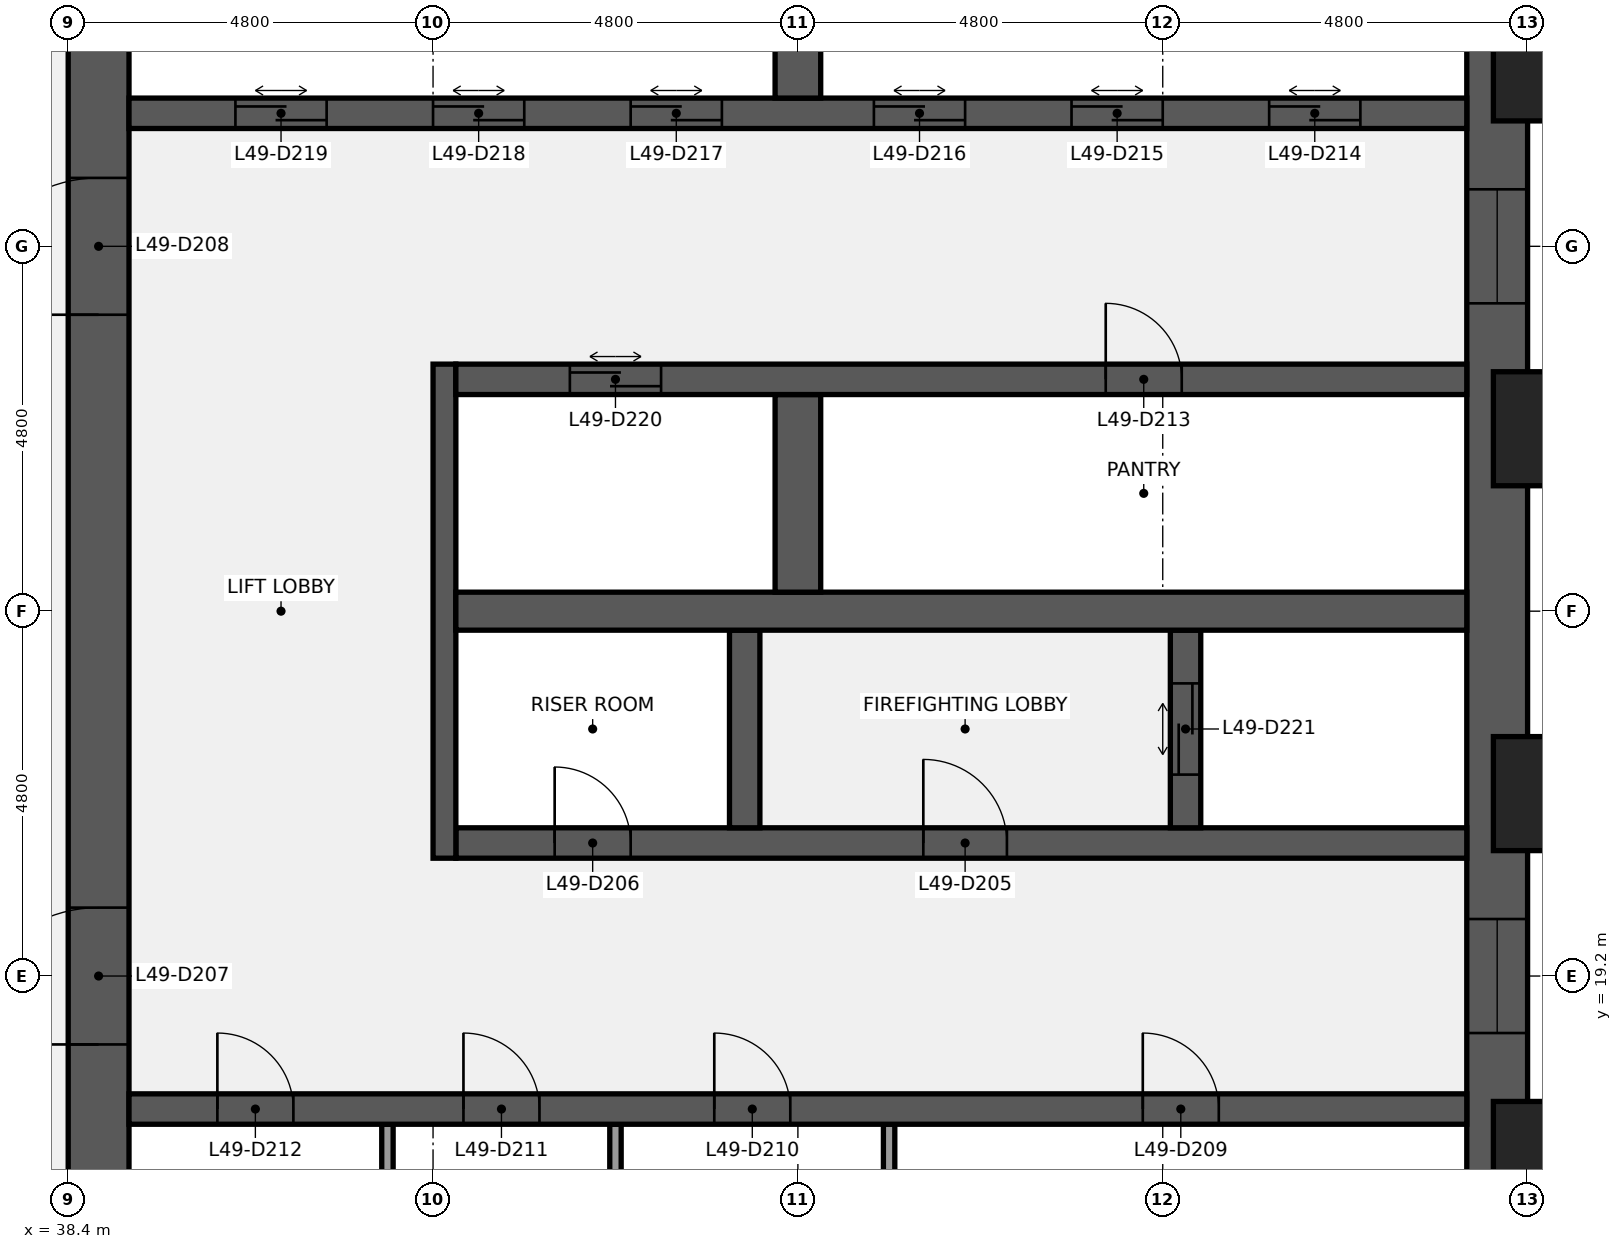
"""IFC4 building model, lengths in metres.
Left out: names, types, materials, properties, quantities, classifications, styles, units other than length and angle.
Written with IfcOpenShell. Run it as: python <this file> out.ifc"""

import sys

from ifc_helpers import new_model, si_unit, direction, frame, frame_2d, origin, origin_2d, place, context, subcontext, project, spatial, rectangle, extrude, element, fill, save


model = new_model("IFC4")
c1 = context("Model", 3, precision=1e-05, world=origin(), true_north=direction((0.0, 1.0)))
c2 = subcontext(c1, "Body", "Model", "MODEL_VIEW")
j1 = project(units=[si_unit("LENGTHUNIT", "METRE"), si_unit("PLANEANGLEUNIT", "RADIAN")], contexts=[c1])
p1 = place(None, origin())
s1 = spatial("IfcSite", under=j1, at=p1, CompositionType="ELEMENT")
p2 = place(p1, origin())
s2 = spatial("IfcBuilding", under=s1, at=p2, CompositionType="ELEMENT")
p3 = place(p2, frame((0.0, 0.0, 225.2)))
s3 = spatial("IfcBuildingStorey", under=s2, at=p3, CompositionType="ELEMENT", Elevation=225.2)
p4 = place(p3, frame((57.2, 38.4, 0.0), z_axis=(0.0, 0.0, 1.0), x_axis=(0.0, -1.0, 0.0)))
e1 = element("IfcWall", 1, at=p4, inside=s3, PredefinedType="SHEAR", context=c2, shape_type="SweptSolid", body=[
    extrude(rectangle(XDim=28.8, YDim=0.8, at=frame_2d((14.4, 0.0))), origin(), (0.0, 0.0, 1.0), 3.84),
])
p5 = place(p4, frame((18.45, 0.0, 0.9)))
e2 = element("IfcOpeningElement", 2, at=p5, cuts=e1, PredefinedType="OPENING", context=c2, shape_type="SweptSolid", body=[
    extrude(rectangle(XDim=1.5, YDim=1.5, at=frame_2d((0.75, 0.75))), frame((0.0, 0.41, 0.0), z_axis=(0.0, -1.0, 0.0), x_axis=(1.0, 0.0, 0.0)), (0.0, 0.0, 1.0), 0.82),
])
p6 = place(p4, frame((8.85, 0.0, 0.9)))
e3 = element("IfcOpeningElement", 3, at=p6, cuts=e1, PredefinedType="OPENING", context=c2, shape_type="SweptSolid", body=[
    extrude(rectangle(XDim=1.5, YDim=1.5, at=frame_2d((0.75, 0.75))), frame((0.0, 0.41, 0.0), z_axis=(0.0, -1.0, 0.0), x_axis=(1.0, 0.0, 0.0)), (0.0, 0.0, 1.0), 0.82),
])
p7 = place(p3, frame((38.8, 9.6, 0.0), z_axis=(0.0, 0.0, 1.0), x_axis=(0.0, 1.0, 0.0)))
e4 = element("IfcWall", 4, at=p7, inside=s3, PredefinedType="SHEAR", context=c2, shape_type="SweptSolid", body=[
    extrude(rectangle(XDim=28.8, YDim=0.8, at=frame_2d((14.4, 0.0))), origin(), (0.0, 0.0, 1.0), 3.84),
])
p8 = place(p7, frame((8.7, 0.0, 0.0)))
e5 = element("IfcOpeningElement", 5, at=p8, cuts=e4, PredefinedType="OPENING", context=c2, shape_type="SweptSolid", body=[
    extrude(rectangle(XDim=1.8, YDim=2.1, at=frame_2d((0.9, 1.05))), frame((0.0, 0.41, 0.0), z_axis=(0.0, -1.0, 0.0), x_axis=(1.0, 0.0, 0.0)), (0.0, 0.0, 1.0), 0.82),
])
p9 = place(p7, frame((18.3, 0.0, 0.0)))
e6 = element("IfcOpeningElement", 6, at=p9, cuts=e4, PredefinedType="OPENING", context=c2, shape_type="SweptSolid", body=[
    extrude(rectangle(XDim=1.8, YDim=2.1, at=frame_2d((0.9, 1.05))), frame((0.0, 0.41, 0.0), z_axis=(0.0, -1.0, 0.0), x_axis=(1.0, 0.0, 0.0)), (0.0, 0.0, 1.0), 0.82),
])
for number, where, z_axis, x_axis in (
    (7, (49.2, 14.65, 0.0), (0.0, 0.0, 1.0), (0.0, 1.0, 0.0)),
    (8, (45.6, 14.65, 0.0), (0.0, 0.0, 1.0), (0.0, 1.0, 0.0)),
    (9, (42.6, 14.65, 0.0), (0.0, 0.0, 1.0), (0.0, 1.0, 0.0)),
):
    element("IfcWall", number, at=place(p3, frame(where, z_axis=z_axis, x_axis=x_axis)), inside=s3, PredefinedType="PARTITIONING", context=c2, shape_type="SweptSolid", body=[
        extrude(rectangle(XDim=2.6, YDim=0.15, at=frame_2d((1.3, 0.0))), origin(), (0.0, 0.0, 1.0), 3.84),
    ])
p10 = place(p3, frame((39.2, 17.45, 0.0), z_axis=(0.0, 0.0, 1.0), x_axis=(1.0, 0.0, 0.0)))
e10 = element("IfcWall", 10, at=p10, inside=s3, PredefinedType="SHEAR", context=c2, shape_type="SweptSolid", body=[
    extrude(rectangle(XDim=17.6, YDim=0.4, at=frame_2d((8.8, 0.0))), origin(), (0.0, 0.0, 1.0), 3.84),
])
p11 = place(p10, frame((13.337, 0.0, 0.0)))
e11 = element("IfcOpeningElement", 11, at=p11, cuts=e10, PredefinedType="OPENING", context=c2, shape_type="SweptSolid", body=[
    extrude(rectangle(XDim=1.0, YDim=2.1, at=frame_2d((0.5, 1.05))), frame((0.0, 0.21, 0.0), z_axis=(0.0, -1.0, 0.0), x_axis=(1.0, 0.0, 0.0)), (0.0, 0.0, 1.0), 0.42),
])
p12 = place(p10, frame((7.7, 0.0, 0.0)))
e12 = element("IfcOpeningElement", 12, at=p12, cuts=e10, PredefinedType="OPENING", context=c2, shape_type="SweptSolid", body=[
    extrude(rectangle(XDim=1.0, YDim=2.1, at=frame_2d((0.5, 1.05))), frame((0.0, 0.21, 0.0), z_axis=(0.0, -1.0, 0.0), x_axis=(1.0, 0.0, 0.0)), (0.0, 0.0, 1.0), 0.42),
])
p13 = place(p10, frame((4.4, 0.0, 0.0)))
e13 = element("IfcOpeningElement", 13, at=p13, cuts=e10, PredefinedType="OPENING", context=c2, shape_type="SweptSolid", body=[
    extrude(rectangle(XDim=1.0, YDim=2.1, at=frame_2d((0.5, 1.05))), frame((0.0, 0.21, 0.0), z_axis=(0.0, -1.0, 0.0), x_axis=(1.0, 0.0, 0.0)), (0.0, 0.0, 1.0), 0.42),
])
p14 = place(p10, frame((1.163, 0.0, 0.0)))
e14 = element("IfcOpeningElement", 14, at=p14, cuts=e10, PredefinedType="OPENING", context=c2, shape_type="SweptSolid", body=[
    extrude(rectangle(XDim=1.0, YDim=2.1, at=frame_2d((0.5, 1.05))), frame((0.0, 0.21, 0.0), z_axis=(0.0, -1.0, 0.0), x_axis=(1.0, 0.0, 0.0)), (0.0, 0.0, 1.0), 0.42),
])
p15 = place(p3, frame((43.5, 20.95, 0.0), z_axis=(0.0, 0.0, 1.0), x_axis=(1.0, 0.0, 0.0)))
e15 = element("IfcWall", 15, at=p15, inside=s3, PredefinedType="SHEAR", context=c2, shape_type="SweptSolid", body=[
    extrude(rectangle(XDim=13.3, YDim=0.4, at=frame_2d((6.65, 0.0))), origin(), (0.0, 0.0, 1.0), 3.84),
])
p16 = place(p15, frame((6.15, 0.0, 0.0)))
e16 = element("IfcOpeningElement", 16, at=p16, cuts=e15, PredefinedType="OPENING", context=c2, shape_type="SweptSolid", body=[
    extrude(rectangle(XDim=1.1, YDim=2.1, at=frame_2d((0.55, 1.05))), frame((0.0, 0.21, 0.0), z_axis=(0.0, -1.0, 0.0), x_axis=(1.0, 0.0, 0.0)), (0.0, 0.0, 1.0), 0.42),
])
p17 = place(p15, frame((1.3, 0.0, 0.0)))
e17 = element("IfcOpeningElement", 17, at=p17, cuts=e15, PredefinedType="OPENING", context=c2, shape_type="SweptSolid", body=[
    extrude(rectangle(XDim=1.0, YDim=2.1, at=frame_2d((0.5, 1.05))), frame((0.0, 0.21, 0.0), z_axis=(0.0, -1.0, 0.0), x_axis=(1.0, 0.0, 0.0)), (0.0, 0.0, 1.0), 0.42),
])
p18 = place(p3, frame((43.35, 20.75, 0.0), z_axis=(0.0, 0.0, 1.0), x_axis=(0.0, 1.0, 0.0)))
e18 = element("IfcWall", 18, at=p18, inside=s3, PredefinedType="SHEAR", context=c2, shape_type="SweptSolid", body=[
    extrude(rectangle(XDim=6.5, YDim=0.3, at=frame_2d((3.25, 0.0))), origin(), (0.0, 0.0, 1.0), 3.84),
])
p19 = place(p3, frame((53.1, 21.15, 0.0), z_axis=(0.0, 0.0, 1.0), x_axis=(0.0, 1.0, 0.0)))
e19 = element("IfcWall", 19, at=p19, inside=s3, PredefinedType="SHEAR", context=c2, shape_type="SweptSolid", body=[
    extrude(rectangle(XDim=2.6, YDim=0.4, at=frame_2d((1.3, 0.0))), origin(), (0.0, 0.0, 1.0), 3.84),
])
p20 = place(p19, frame((0.7, 0.0, 0.0)))
e20 = element("IfcOpeningElement", 20, at=p20, cuts=e19, PredefinedType="OPENING", context=c2, shape_type="SweptSolid", body=[
    extrude(rectangle(XDim=1.2, YDim=2.1, at=frame_2d((0.6, 1.05))), frame((0.0, 0.21, 0.0), z_axis=(0.0, -1.0, 0.0), x_axis=(1.0, 0.0, 0.0)), (0.0, 0.0, 1.0), 0.42),
])
p21 = place(p3, frame((47.3, 21.15, 0.0), z_axis=(0.0, 0.0, 1.0), x_axis=(0.0, 1.0, 0.0)))
e21 = element("IfcWall", 21, at=p21, inside=s3, PredefinedType="SHEAR", context=c2, shape_type="SweptSolid", body=[
    extrude(rectangle(XDim=2.6, YDim=0.4, at=frame_2d((1.3, 0.0))), origin(), (0.0, 0.0, 1.0), 3.84),
])
p22 = place(p3, frame((43.5, 24.0, 0.0), z_axis=(0.0, 0.0, 1.0), x_axis=(1.0, 0.0, 0.0)))
e22 = element("IfcWall", 22, at=p22, inside=s3, PredefinedType="SHEAR", context=c2, shape_type="SweptSolid", body=[
    extrude(rectangle(XDim=13.3, YDim=0.5, at=frame_2d((6.65, 0.0))), origin(), (0.0, 0.0, 1.0), 3.84),
])
p23 = place(p3, frame((48.0, 24.25, 0.0), z_axis=(0.0, 0.0, 1.0), x_axis=(0.0, 1.0, 0.0)))
e23 = element("IfcWall", 23, at=p23, inside=s3, PredefinedType="SHEAR", context=c2, shape_type="SweptSolid", body=[
    extrude(rectangle(XDim=2.6, YDim=0.6, at=frame_2d((1.3, 0.0))), origin(), (0.0, 0.0, 1.0), 3.84),
])
p24 = place(p3, frame((43.5, 27.05, 0.0), z_axis=(0.0, 0.0, 1.0), x_axis=(1.0, 0.0, 0.0)))
e24 = element("IfcWall", 24, at=p24, inside=s3, PredefinedType="SHEAR", context=c2, shape_type="SweptSolid", body=[
    extrude(rectangle(XDim=13.3, YDim=0.4, at=frame_2d((6.65, 0.0))), origin(), (0.0, 0.0, 1.0), 3.84),
])
p25 = place(p24, frame((8.55, 0.0, 0.0)))
e25 = element("IfcOpeningElement", 25, at=p25, cuts=e24, PredefinedType="OPENING", context=c2, shape_type="SweptSolid", body=[
    extrude(rectangle(XDim=1.0, YDim=2.1, at=frame_2d((0.5, 1.05))), frame((0.0, 0.21, 0.0), z_axis=(0.0, -1.0, 0.0), x_axis=(1.0, 0.0, 0.0)), (0.0, 0.0, 1.0), 0.42),
])
p26 = place(p24, frame((1.5, 0.0, 0.0)))
e26 = element("IfcOpeningElement", 26, at=p26, cuts=e24, PredefinedType="OPENING", context=c2, shape_type="SweptSolid", body=[
    extrude(rectangle(XDim=1.2, YDim=2.1, at=frame_2d((0.6, 1.05))), frame((0.0, 0.21, 0.0), z_axis=(0.0, -1.0, 0.0), x_axis=(1.0, 0.0, 0.0)), (0.0, 0.0, 1.0), 0.42),
])
p27 = place(p3, frame((39.2, 30.55, 0.0), z_axis=(0.0, 0.0, 1.0), x_axis=(1.0, 0.0, 0.0)))
e27 = element("IfcWall", 27, at=p27, inside=s3, PredefinedType="SHEAR", context=c2, shape_type="SweptSolid", body=[
    extrude(rectangle(XDim=17.6, YDim=0.4, at=frame_2d((8.8, 0.0))), origin(), (0.0, 0.0, 1.0), 3.84),
])
p28 = place(p27, frame((15.0, 0.0, 0.0)))
e28 = element("IfcOpeningElement", 28, at=p28, cuts=e27, PredefinedType="OPENING", context=c2, shape_type="SweptSolid", body=[
    extrude(rectangle(XDim=1.2, YDim=2.1, at=frame_2d((0.6, 1.05))), frame((0.0, 0.21, 0.0), z_axis=(0.0, -1.0, 0.0), x_axis=(1.0, 0.0, 0.0)), (0.0, 0.0, 1.0), 0.42),
])
p29 = place(p27, frame((12.4, 0.0, 0.0)))
e29 = element("IfcOpeningElement", 29, at=p29, cuts=e27, PredefinedType="OPENING", context=c2, shape_type="SweptSolid", body=[
    extrude(rectangle(XDim=1.2, YDim=2.1, at=frame_2d((0.6, 1.05))), frame((0.0, 0.21, 0.0), z_axis=(0.0, -1.0, 0.0), x_axis=(1.0, 0.0, 0.0)), (0.0, 0.0, 1.0), 0.42),
])
p30 = place(p27, frame((9.8, 0.0, 0.0)))
e30 = element("IfcOpeningElement", 30, at=p30, cuts=e27, PredefinedType="OPENING", context=c2, shape_type="SweptSolid", body=[
    extrude(rectangle(XDim=1.2, YDim=2.1, at=frame_2d((0.6, 1.05))), frame((0.0, 0.21, 0.0), z_axis=(0.0, -1.0, 0.0), x_axis=(1.0, 0.0, 0.0)), (0.0, 0.0, 1.0), 0.42),
])
p31 = place(p27, frame((6.6, 0.0, 0.0)))
e31 = element("IfcOpeningElement", 31, at=p31, cuts=e27, PredefinedType="OPENING", context=c2, shape_type="SweptSolid", body=[
    extrude(rectangle(XDim=1.2, YDim=2.1, at=frame_2d((0.6, 1.05))), frame((0.0, 0.21, 0.0), z_axis=(0.0, -1.0, 0.0), x_axis=(1.0, 0.0, 0.0)), (0.0, 0.0, 1.0), 0.42),
])
p32 = place(p27, frame((4.0, 0.0, 0.0)))
e32 = element("IfcOpeningElement", 32, at=p32, cuts=e27, PredefinedType="OPENING", context=c2, shape_type="SweptSolid", body=[
    extrude(rectangle(XDim=1.2, YDim=2.1, at=frame_2d((0.6, 1.05))), frame((0.0, 0.21, 0.0), z_axis=(0.0, -1.0, 0.0), x_axis=(1.0, 0.0, 0.0)), (0.0, 0.0, 1.0), 0.42),
])
p33 = place(p27, frame((1.4, 0.0, 0.0)))
e33 = element("IfcOpeningElement", 33, at=p33, cuts=e27, PredefinedType="OPENING", context=c2, shape_type="SweptSolid", body=[
    extrude(rectangle(XDim=1.2, YDim=2.1, at=frame_2d((0.6, 1.05))), frame((0.0, 0.21, 0.0), z_axis=(0.0, -1.0, 0.0), x_axis=(1.0, 0.0, 0.0)), (0.0, 0.0, 1.0), 0.42),
])
p34 = place(p3, frame((48.0, 30.75, 0.0), z_axis=(0.0, 0.0, 1.0), x_axis=(0.0, 1.0, 0.0)))
e34 = element("IfcWall", 34, at=p34, inside=s3, PredefinedType="SHEAR", context=c2, shape_type="SweptSolid", body=[
    extrude(rectangle(XDim=2.6, YDim=0.6, at=frame_2d((1.3, 0.0))), origin(), (0.0, 0.0, 1.0), 3.84),
])
for number, where, z_axis, x_axis in (
    (35, (58.35, 16.8, 0.0), (0.0, 0.0, 1.0), (0.0, 1.0, 0.0)),
    (36, (58.35, 21.6, 0.0), (0.0, 0.0, 1.0), (0.0, 1.0, 0.0)),
    (37, (58.35, 26.4, 0.0), (0.0, 0.0, 1.0), (0.0, 1.0, 0.0)),
    (38, (58.35, 31.2, 0.0), (0.0, 0.0, 1.0), (0.0, 1.0, 0.0)),
):
    element("IfcColumn", number, at=place(p3, frame(where, z_axis=z_axis, x_axis=x_axis)), inside=s3, PredefinedType="PILASTER", context=c2, shape_type="SweptSolid", body=[
        extrude(rectangle(XDim=2.4, YDim=1.5, at=origin_2d()), origin(), (0.0, 0.0, 1.0), 4.0),
    ])
p35 = place(p16, origin())
e39 = element("IfcDoor", 39, at=p35, inside=s3, OperationType="SINGLE_SWING_LEFT", PredefinedType="DOOR", context=c2, shape_type="SweptSolid", body=[
    extrude(rectangle(XDim=1.1, YDim=2.1, at=frame_2d((0.55, 1.05))), frame((0.0, 0.025, 0.0), z_axis=(0.0, -1.0, 0.0), x_axis=(1.0, 0.0, 0.0)), (0.0, 0.0, 1.0), 0.05),
])
fill(e16, e39)
p36 = place(p17, origin())
e40 = element("IfcDoor", 40, at=p36, inside=s3, OperationType="SINGLE_SWING_LEFT", PredefinedType="DOOR", context=c2, shape_type="SweptSolid", body=[
    extrude(rectangle(XDim=1.0, YDim=2.1, at=frame_2d((0.5, 1.05))), frame((0.0, 0.025, 0.0), z_axis=(0.0, -1.0, 0.0), x_axis=(1.0, 0.0, 0.0)), (0.0, 0.0, 1.0), 0.05),
])
fill(e17, e40)
p37 = place(p8, origin())
e41 = element("IfcDoor", 41, at=p37, inside=s3, OperationType="DOUBLE_DOOR_SINGLE_SWING", PredefinedType="DOOR", context=c2, shape_type="SweptSolid", body=[
    extrude(rectangle(XDim=1.8, YDim=2.1, at=frame_2d((0.9, 1.05))), frame((0.0, 0.025, 0.0), z_axis=(0.0, -1.0, 0.0), x_axis=(1.0, 0.0, 0.0)), (0.0, 0.0, 1.0), 0.05),
])
fill(e5, e41)
p38 = place(p9, origin())
e42 = element("IfcDoor", 42, at=p38, inside=s3, OperationType="DOUBLE_DOOR_SINGLE_SWING", PredefinedType="DOOR", context=c2, shape_type="SweptSolid", body=[
    extrude(rectangle(XDim=1.8, YDim=2.1, at=frame_2d((0.9, 1.05))), frame((0.0, 0.025, 0.0), z_axis=(0.0, -1.0, 0.0), x_axis=(1.0, 0.0, 0.0)), (0.0, 0.0, 1.0), 0.05),
])
fill(e6, e42)
p39 = place(p11, origin())
e43 = element("IfcDoor", 43, at=p39, inside=s3, OperationType="SINGLE_SWING_LEFT", PredefinedType="DOOR", context=c2, shape_type="SweptSolid", body=[
    extrude(rectangle(XDim=1.0, YDim=2.1, at=frame_2d((0.5, 1.05))), frame((0.0, 0.025, 0.0), z_axis=(0.0, -1.0, 0.0), x_axis=(1.0, 0.0, 0.0)), (0.0, 0.0, 1.0), 0.05),
])
fill(e11, e43)
p40 = place(p12, origin())
e44 = element("IfcDoor", 44, at=p40, inside=s3, OperationType="SINGLE_SWING_LEFT", PredefinedType="DOOR", context=c2, shape_type="SweptSolid", body=[
    extrude(rectangle(XDim=1.0, YDim=2.1, at=frame_2d((0.5, 1.05))), frame((0.0, 0.025, 0.0), z_axis=(0.0, -1.0, 0.0), x_axis=(1.0, 0.0, 0.0)), (0.0, 0.0, 1.0), 0.05),
])
fill(e12, e44)
p41 = place(p13, origin())
e45 = element("IfcDoor", 45, at=p41, inside=s3, OperationType="SINGLE_SWING_LEFT", PredefinedType="DOOR", context=c2, shape_type="SweptSolid", body=[
    extrude(rectangle(XDim=1.0, YDim=2.1, at=frame_2d((0.5, 1.05))), frame((0.0, 0.025, 0.0), z_axis=(0.0, -1.0, 0.0), x_axis=(1.0, 0.0, 0.0)), (0.0, 0.0, 1.0), 0.05),
])
fill(e13, e45)
p42 = place(p14, origin())
e46 = element("IfcDoor", 46, at=p42, inside=s3, OperationType="SINGLE_SWING_LEFT", PredefinedType="DOOR", context=c2, shape_type="SweptSolid", body=[
    extrude(rectangle(XDim=1.0, YDim=2.1, at=frame_2d((0.5, 1.05))), frame((0.0, 0.025, 0.0), z_axis=(0.0, -1.0, 0.0), x_axis=(1.0, 0.0, 0.0)), (0.0, 0.0, 1.0), 0.05),
])
fill(e14, e46)
p43 = place(p25, origin())
e47 = element("IfcDoor", 47, at=p43, inside=s3, OperationType="SINGLE_SWING_LEFT", PredefinedType="DOOR", context=c2, shape_type="SweptSolid", body=[
    extrude(rectangle(XDim=1.0, YDim=2.1, at=frame_2d((0.5, 1.05))), frame((0.0, 0.025, 0.0), z_axis=(0.0, -1.0, 0.0), x_axis=(1.0, 0.0, 0.0)), (0.0, 0.0, 1.0), 0.05),
])
fill(e25, e47)
p44 = place(p28, origin())
e48 = element("IfcDoor", 48, at=p44, inside=s3, OperationType="DOUBLE_DOOR_SLIDING", PredefinedType="DOOR", context=c2, shape_type="SweptSolid", body=[
    extrude(rectangle(XDim=1.2, YDim=2.1, at=frame_2d((0.6, 1.05))), frame((0.0, 0.025, 0.0), z_axis=(0.0, -1.0, 0.0), x_axis=(1.0, 0.0, 0.0)), (0.0, 0.0, 1.0), 0.05),
])
fill(e28, e48)
p45 = place(p29, origin())
e49 = element("IfcDoor", 49, at=p45, inside=s3, OperationType="DOUBLE_DOOR_SLIDING", PredefinedType="DOOR", context=c2, shape_type="SweptSolid", body=[
    extrude(rectangle(XDim=1.2, YDim=2.1, at=frame_2d((0.6, 1.05))), frame((0.0, 0.025, 0.0), z_axis=(0.0, -1.0, 0.0), x_axis=(1.0, 0.0, 0.0)), (0.0, 0.0, 1.0), 0.05),
])
fill(e29, e49)
p46 = place(p30, origin())
e50 = element("IfcDoor", 50, at=p46, inside=s3, OperationType="DOUBLE_DOOR_SLIDING", PredefinedType="DOOR", context=c2, shape_type="SweptSolid", body=[
    extrude(rectangle(XDim=1.2, YDim=2.1, at=frame_2d((0.6, 1.05))), frame((0.0, 0.025, 0.0), z_axis=(0.0, -1.0, 0.0), x_axis=(1.0, 0.0, 0.0)), (0.0, 0.0, 1.0), 0.05),
])
fill(e30, e50)
p47 = place(p31, origin())
e51 = element("IfcDoor", 51, at=p47, inside=s3, OperationType="DOUBLE_DOOR_SLIDING", PredefinedType="DOOR", context=c2, shape_type="SweptSolid", body=[
    extrude(rectangle(XDim=1.2, YDim=2.1, at=frame_2d((0.6, 1.05))), frame((0.0, 0.025, 0.0), z_axis=(0.0, -1.0, 0.0), x_axis=(1.0, 0.0, 0.0)), (0.0, 0.0, 1.0), 0.05),
])
fill(e31, e51)
p48 = place(p32, origin())
e52 = element("IfcDoor", 52, at=p48, inside=s3, OperationType="DOUBLE_DOOR_SLIDING", PredefinedType="DOOR", context=c2, shape_type="SweptSolid", body=[
    extrude(rectangle(XDim=1.2, YDim=2.1, at=frame_2d((0.6, 1.05))), frame((0.0, 0.025, 0.0), z_axis=(0.0, -1.0, 0.0), x_axis=(1.0, 0.0, 0.0)), (0.0, 0.0, 1.0), 0.05),
])
fill(e32, e52)
p49 = place(p33, origin())
e53 = element("IfcDoor", 53, at=p49, inside=s3, OperationType="DOUBLE_DOOR_SLIDING", PredefinedType="DOOR", context=c2, shape_type="SweptSolid", body=[
    extrude(rectangle(XDim=1.2, YDim=2.1, at=frame_2d((0.6, 1.05))), frame((0.0, 0.025, 0.0), z_axis=(0.0, -1.0, 0.0), x_axis=(1.0, 0.0, 0.0)), (0.0, 0.0, 1.0), 0.05),
])
fill(e33, e53)
p50 = place(p26, origin())
e54 = element("IfcDoor", 54, at=p50, inside=s3, OperationType="DOUBLE_DOOR_SLIDING", PredefinedType="DOOR", context=c2, shape_type="SweptSolid", body=[
    extrude(rectangle(XDim=1.2, YDim=2.1, at=frame_2d((0.6, 1.05))), frame((0.0, 0.025, 0.0), z_axis=(0.0, -1.0, 0.0), x_axis=(1.0, 0.0, 0.0)), (0.0, 0.0, 1.0), 0.05),
])
fill(e26, e54)
p51 = place(p20, origin())
e55 = element("IfcDoor", 55, at=p51, inside=s3, OperationType="DOUBLE_DOOR_SLIDING", PredefinedType="DOOR", context=c2, shape_type="SweptSolid", body=[
    extrude(rectangle(XDim=1.2, YDim=2.1, at=frame_2d((0.6, 1.05))), frame((0.0, 0.025, 0.0), z_axis=(0.0, -1.0, 0.0), x_axis=(1.0, 0.0, 0.0)), (0.0, 0.0, 1.0), 0.05),
])
fill(e20, e55)
p52 = place(p5, origin())
e56 = element("IfcWindow", 56, at=p52, inside=s3, PartitioningType="SINGLE_PANEL", PredefinedType="WINDOW", context=c2, shape_type="SweptSolid", body=[
    extrude(rectangle(XDim=1.5, YDim=1.5, at=frame_2d((0.75, 0.75))), frame((0.0, 0.03, 0.0), z_axis=(0.0, -1.0, 0.0), x_axis=(1.0, 0.0, 0.0)), (0.0, 0.0, 1.0), 0.06),
])
fill(e2, e56)
p53 = place(p6, origin())
e57 = element("IfcWindow", 57, at=p53, inside=s3, PartitioningType="SINGLE_PANEL", PredefinedType="WINDOW", context=c2, shape_type="SweptSolid", body=[
    extrude(rectangle(XDim=1.5, YDim=1.5, at=frame_2d((0.75, 0.75))), frame((0.0, 0.03, 0.0), z_axis=(0.0, -1.0, 0.0), x_axis=(1.0, 0.0, 0.0)), (0.0, 0.0, 1.0), 0.06),
])
fill(e3, e57)
save(model, sys.argv[1])
